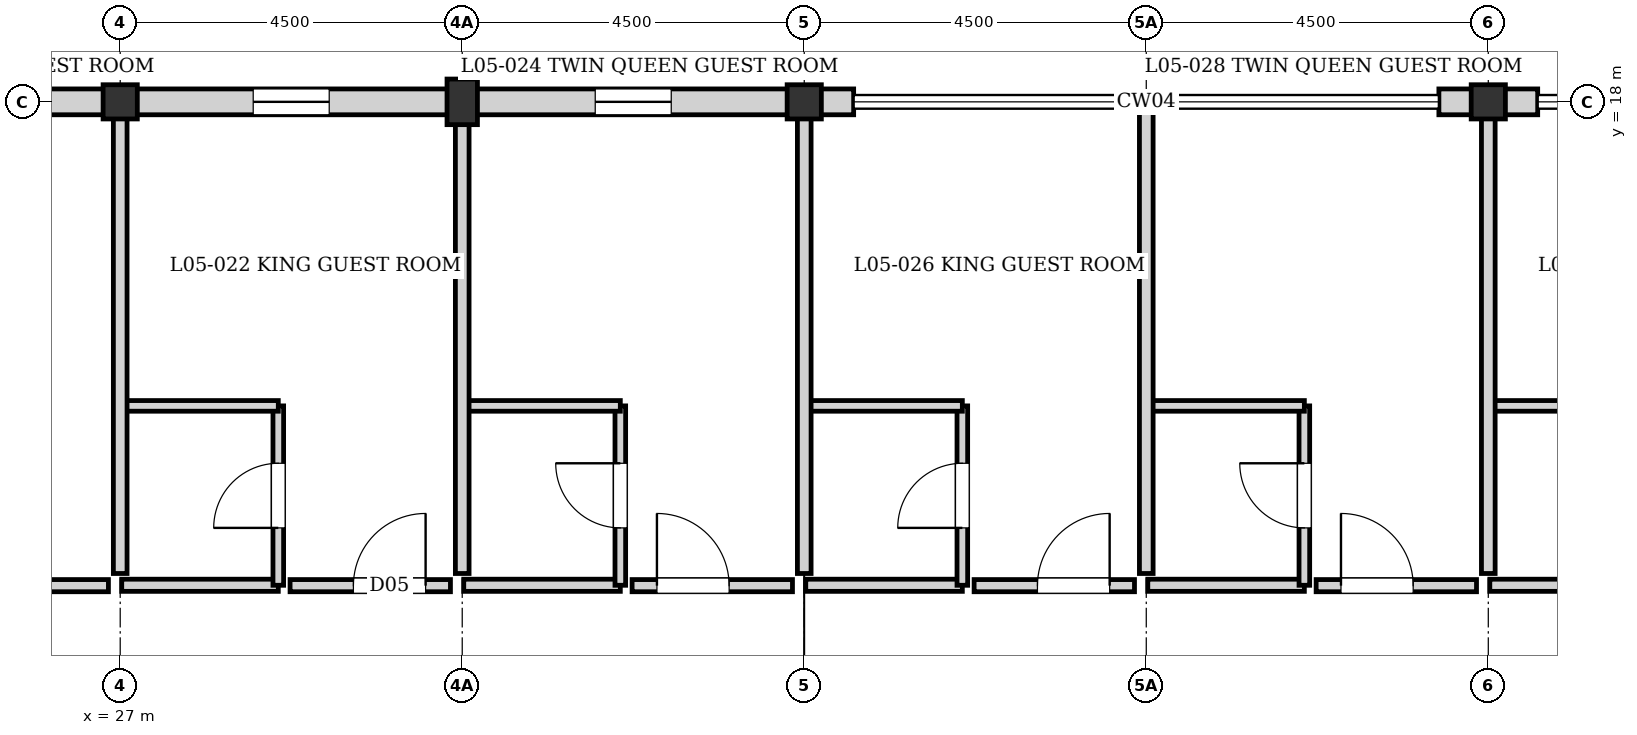
"""IFC4 building model, lengths in metres.
Left out: names, types, materials, properties, quantities, classifications, styles, units other than length and angle.
Written with IfcOpenShell. Run it as: python <this file> out.ifc"""

import sys

from ifc_helpers import new_model, si_unit, direction, frame, frame_2d, origin, origin_2d, place, context, subcontext, project, spatial, rectangle, extrude, element, fill, save


model = new_model("IFC4")
c1 = context("Model", 3, precision=1e-05, world=origin(), true_north=direction((0.0, 1.0)))
c2 = subcontext(c1, "Body", "Model", "MODEL_VIEW")
j1 = project(units=[si_unit("LENGTHUNIT", "METRE"), si_unit("PLANEANGLEUNIT", "RADIAN")], contexts=[c1])
p1 = place(None, origin())
s1 = spatial("IfcSite", under=j1, at=p1, CompositionType="ELEMENT")
p2 = place(p1, origin())
s2 = spatial("IfcBuilding", under=s1, at=p2, CompositionType="ELEMENT")
p3 = place(p2, frame((0.0, 0.0, 17.6)))
s3 = spatial("IfcBuildingStorey", under=s2, at=p3, CompositionType="ELEMENT", Elevation=17.6)
for number, where, z_axis, x_axis in (
    (1, (27.0, 18.0, 0.0), (0.0, 0.0, 1.0), (1.0, 0.0, 0.0)),
    (2, (36.0, 18.0, 0.0), (0.0, 0.0, 1.0), (1.0, 0.0, 0.0)),
    (3, (45.0, 18.0, 0.0), (0.0, 0.0, 1.0), (1.0, 0.0, 0.0)),
):
    element("IfcColumn", number, at=place(p3, frame(where, z_axis=z_axis, x_axis=x_axis)), inside=s3, PredefinedType="COLUMN", context=c2, shape_type="SweptSolid", body=[
        extrude(rectangle(XDim=0.45, YDim=0.45, at=origin_2d()), origin(), (0.0, 0.0, 1.0), 3.04),
    ])
p4 = place(p3, frame((31.5, 18.0, 0.0), z_axis=(0.0, 0.0, 1.0), x_axis=(1.0, 0.0, 0.0)))
e4 = element("IfcColumn", 4, at=p4, inside=s3, PredefinedType="PILASTER", context=c2, shape_type="SweptSolid", body=[
    extrude(rectangle(XDim=0.4, YDim=0.6, at=origin_2d()), origin(), (0.0, 0.0, 1.0), 3.04),
])
p5 = place(p3, frame((18.0, 18.0, 0.0), z_axis=(0.0, 0.0, 1.0), x_axis=(1.0, 0.0, 0.0)))
e5 = element("IfcWall", 5, at=p5, inside=s3, PredefinedType="SOLIDWALL", context=c2, shape_type="SweptSolid", body=[
    extrude(rectangle(XDim=9.0, YDim=0.34, at=frame_2d((4.5, 0.0))), origin(), (0.0, 0.0, 1.0), 2.48),
])
p6 = place(p5, frame((1.75, 0.0, 0.35)))
e6 = element("IfcOpeningElement", 6, at=p6, cuts=e5, PredefinedType="OPENING", context=c2, shape_type="SweptSolid", body=[
    extrude(rectangle(XDim=1.0, YDim=1.6, at=frame_2d((0.5, 0.8))), frame((0.0, 0.18, 0.0), z_axis=(0.0, -1.0, 0.0), x_axis=(1.0, 0.0, 0.0)), (0.0, 0.0, 1.0), 0.36),
])
p7 = place(p5, frame((6.25, 0.0, 0.35)))
e7 = element("IfcOpeningElement", 7, at=p7, cuts=e5, PredefinedType="OPENING", context=c2, shape_type="SweptSolid", body=[
    extrude(rectangle(XDim=1.0, YDim=1.6, at=frame_2d((0.5, 0.8))), frame((0.0, 0.18, 0.0), z_axis=(0.0, -1.0, 0.0), x_axis=(1.0, 0.0, 0.0)), (0.0, 0.0, 1.0), 0.36),
])
p8 = place(p3, frame((27.0, 18.0, 0.0), z_axis=(0.0, 0.0, 1.0), x_axis=(1.0, 0.0, 0.0)))
e8 = element("IfcWall", 8, at=p8, inside=s3, PredefinedType="SOLIDWALL", context=c2, shape_type="SweptSolid", body=[
    extrude(rectangle(XDim=9.0, YDim=0.34, at=frame_2d((4.5, 0.0))), origin(), (0.0, 0.0, 1.0), 2.42),
])
p9 = place(p8, frame((1.75, 0.0, 0.35)))
e9 = element("IfcOpeningElement", 9, at=p9, cuts=e8, PredefinedType="OPENING", context=c2, shape_type="SweptSolid", body=[
    extrude(rectangle(XDim=1.0, YDim=1.6, at=frame_2d((0.5, 0.8))), frame((0.0, 0.18, 0.0), z_axis=(0.0, -1.0, 0.0), x_axis=(1.0, 0.0, 0.0)), (0.0, 0.0, 1.0), 0.36),
])
p10 = place(p8, frame((6.25, 0.0, 0.35)))
e10 = element("IfcOpeningElement", 10, at=p10, cuts=e8, PredefinedType="OPENING", context=c2, shape_type="SweptSolid", body=[
    extrude(rectangle(XDim=1.0, YDim=1.6, at=frame_2d((0.5, 0.8))), frame((0.0, 0.18, 0.0), z_axis=(0.0, -1.0, 0.0), x_axis=(1.0, 0.0, 0.0)), (0.0, 0.0, 1.0), 0.36),
])
for number, where, z_axis, x_axis in (
    (11, (36.0, 18.0, 0.0), (0.0, 0.0, 1.0), (1.0, 0.0, 0.0)),
    (12, (44.35, 18.0, 0.0), (0.0, 0.0, 1.0), (1.0, 0.0, 0.0)),
):
    element("IfcWall", number, at=place(p3, frame(where, z_axis=z_axis, x_axis=x_axis)), inside=s3, PredefinedType="SOLIDWALL", context=c2, shape_type="SweptSolid", body=[
        extrude(rectangle(XDim=0.65, YDim=0.34, at=frame_2d((0.325, 0.0))), origin(), (0.0, 0.0, 1.0), 2.38),
    ])
p11 = place(p3, frame((45.0, 18.0, 0.0), z_axis=(0.0, 0.0, 1.0), x_axis=(1.0, 0.0, 0.0)))
e13 = element("IfcWall", 13, at=p11, inside=s3, PredefinedType="SOLIDWALL", context=c2, shape_type="SweptSolid", body=[
    extrude(rectangle(XDim=0.65, YDim=0.34, at=frame_2d((0.325, 0.0))), origin(), (0.0, 0.0, 1.0), 2.55),
])
p12 = place(p3, frame((27.02, 11.64, 0.0), z_axis=(0.0, 0.0, 1.0), x_axis=(1.0, 0.0, 0.0)))
e14 = element("IfcWall", 14, at=p12, inside=s3, PredefinedType="PARTITIONING", context=c2, shape_type="SweptSolid", body=[
    extrude(rectangle(XDim=2.06, YDim=0.16, at=frame_2d((1.03, 0.0))), origin(), (0.0, 0.0, 1.0), 2.82),
])
p13 = place(p3, frame((29.08, 11.64, 0.0), z_axis=(0.0, 0.0, 1.0), x_axis=(0.0, 1.0, 0.0)))
e15 = element("IfcWall", 15, at=p13, inside=s3, PredefinedType="PLUMBINGWALL", context=c2, shape_type="SweptSolid", body=[
    extrude(rectangle(XDim=2.36, YDim=0.14, at=frame_2d((1.18, 0.0))), origin(), (0.0, 0.0, 1.0), 2.82),
])
p14 = place(p13, frame((0.755, 0.0, 0.0)))
e16 = element("IfcOpeningElement", 16, at=p14, cuts=e15, PredefinedType="OPENING", context=c2, shape_type="SweptSolid", body=[
    extrude(rectangle(XDim=0.85, YDim=2.04, at=frame_2d((0.425, 1.02))), frame((0.0, 0.08, 0.0), z_axis=(0.0, -1.0, 0.0), x_axis=(1.0, 0.0, 0.0)), (0.0, 0.0, 1.0), 0.16),
])
p15 = place(p3, frame((27.02, 14.0, 0.0), z_axis=(0.0, 0.0, 1.0), x_axis=(1.0, 0.0, 0.0)))
e17 = element("IfcWall", 17, at=p15, inside=s3, PredefinedType="PLUMBINGWALL", context=c2, shape_type="SweptSolid", body=[
    extrude(rectangle(XDim=2.06, YDim=0.14, at=frame_2d((1.03, 0.0))), origin(), (0.0, 0.0, 1.0), 2.82),
])
p16 = place(p3, frame((31.52, 11.64, 0.0), z_axis=(0.0, 0.0, 1.0), x_axis=(1.0, 0.0, 0.0)))
e18 = element("IfcWall", 18, at=p16, inside=s3, PredefinedType="PARTITIONING", context=c2, shape_type="SweptSolid", body=[
    extrude(rectangle(XDim=2.06, YDim=0.16, at=frame_2d((1.03, 0.0))), origin(), (0.0, 0.0, 1.0), 2.82),
])
p17 = place(p3, frame((33.58, 11.64, 0.0), z_axis=(0.0, 0.0, 1.0), x_axis=(0.0, 1.0, 0.0)))
e19 = element("IfcWall", 19, at=p17, inside=s3, PredefinedType="PLUMBINGWALL", context=c2, shape_type="SweptSolid", body=[
    extrude(rectangle(XDim=2.36, YDim=0.14, at=frame_2d((1.18, 0.0))), origin(), (0.0, 0.0, 1.0), 2.82),
])
p18 = place(p17, frame((0.755, 0.0, 0.0)))
e20 = element("IfcOpeningElement", 20, at=p18, cuts=e19, PredefinedType="OPENING", context=c2, shape_type="SweptSolid", body=[
    extrude(rectangle(XDim=0.85, YDim=2.04, at=frame_2d((0.425, 1.02))), frame((0.0, 0.08, 0.0), z_axis=(0.0, -1.0, 0.0), x_axis=(1.0, 0.0, 0.0)), (0.0, 0.0, 1.0), 0.16),
])
p19 = place(p3, frame((31.52, 14.0, 0.0), z_axis=(0.0, 0.0, 1.0), x_axis=(1.0, 0.0, 0.0)))
e21 = element("IfcWall", 21, at=p19, inside=s3, PredefinedType="PLUMBINGWALL", context=c2, shape_type="SweptSolid", body=[
    extrude(rectangle(XDim=2.06, YDim=0.14, at=frame_2d((1.03, 0.0))), origin(), (0.0, 0.0, 1.0), 2.82),
])
p20 = place(p3, frame((36.02, 11.64, 0.0), z_axis=(0.0, 0.0, 1.0), x_axis=(1.0, 0.0, 0.0)))
e22 = element("IfcWall", 22, at=p20, inside=s3, PredefinedType="PARTITIONING", context=c2, shape_type="SweptSolid", body=[
    extrude(rectangle(XDim=2.06, YDim=0.16, at=frame_2d((1.03, 0.0))), origin(), (0.0, 0.0, 1.0), 2.82),
])
p21 = place(p3, frame((38.08, 11.64, 0.0), z_axis=(0.0, 0.0, 1.0), x_axis=(0.0, 1.0, 0.0)))
e23 = element("IfcWall", 23, at=p21, inside=s3, PredefinedType="PLUMBINGWALL", context=c2, shape_type="SweptSolid", body=[
    extrude(rectangle(XDim=2.36, YDim=0.14, at=frame_2d((1.18, 0.0))), origin(), (0.0, 0.0, 1.0), 2.82),
])
p22 = place(p21, frame((0.755, 0.0, 0.0)))
e24 = element("IfcOpeningElement", 24, at=p22, cuts=e23, PredefinedType="OPENING", context=c2, shape_type="SweptSolid", body=[
    extrude(rectangle(XDim=0.85, YDim=2.04, at=frame_2d((0.425, 1.02))), frame((0.0, 0.08, 0.0), z_axis=(0.0, -1.0, 0.0), x_axis=(1.0, 0.0, 0.0)), (0.0, 0.0, 1.0), 0.16),
])
p23 = place(p3, frame((36.02, 14.0, 0.0), z_axis=(0.0, 0.0, 1.0), x_axis=(1.0, 0.0, 0.0)))
e25 = element("IfcWall", 25, at=p23, inside=s3, PredefinedType="PLUMBINGWALL", context=c2, shape_type="SweptSolid", body=[
    extrude(rectangle(XDim=2.06, YDim=0.14, at=frame_2d((1.03, 0.0))), origin(), (0.0, 0.0, 1.0), 2.82),
])
p24 = place(p3, frame((40.52, 11.64, 0.0), z_axis=(0.0, 0.0, 1.0), x_axis=(1.0, 0.0, 0.0)))
e26 = element("IfcWall", 26, at=p24, inside=s3, PredefinedType="PARTITIONING", context=c2, shape_type="SweptSolid", body=[
    extrude(rectangle(XDim=2.06, YDim=0.16, at=frame_2d((1.03, 0.0))), origin(), (0.0, 0.0, 1.0), 2.82),
])
p25 = place(p3, frame((42.58, 11.64, 0.0), z_axis=(0.0, 0.0, 1.0), x_axis=(0.0, 1.0, 0.0)))
e27 = element("IfcWall", 27, at=p25, inside=s3, PredefinedType="PLUMBINGWALL", context=c2, shape_type="SweptSolid", body=[
    extrude(rectangle(XDim=2.36, YDim=0.14, at=frame_2d((1.18, 0.0))), origin(), (0.0, 0.0, 1.0), 2.82),
])
p26 = place(p25, frame((0.755, 0.0, 0.0)))
e28 = element("IfcOpeningElement", 28, at=p26, cuts=e27, PredefinedType="OPENING", context=c2, shape_type="SweptSolid", body=[
    extrude(rectangle(XDim=0.85, YDim=2.04, at=frame_2d((0.425, 1.02))), frame((0.0, 0.08, 0.0), z_axis=(0.0, -1.0, 0.0), x_axis=(1.0, 0.0, 0.0)), (0.0, 0.0, 1.0), 0.16),
])
p27 = place(p3, frame((40.52, 14.0, 0.0), z_axis=(0.0, 0.0, 1.0), x_axis=(1.0, 0.0, 0.0)))
e29 = element("IfcWall", 29, at=p27, inside=s3, PredefinedType="PLUMBINGWALL", context=c2, shape_type="SweptSolid", body=[
    extrude(rectangle(XDim=2.06, YDim=0.14, at=frame_2d((1.03, 0.0))), origin(), (0.0, 0.0, 1.0), 2.82),
])
p28 = place(p3, frame((45.02, 11.64, 0.0), z_axis=(0.0, 0.0, 1.0), x_axis=(1.0, 0.0, 0.0)))
e30 = element("IfcWall", 30, at=p28, inside=s3, PredefinedType="PARTITIONING", context=c2, shape_type="SweptSolid", body=[
    extrude(rectangle(XDim=2.06, YDim=0.16, at=frame_2d((1.03, 0.0))), origin(), (0.0, 0.0, 1.0), 2.82),
])
p29 = place(p3, frame((45.02, 14.0, 0.0), z_axis=(0.0, 0.0, 1.0), x_axis=(1.0, 0.0, 0.0)))
e31 = element("IfcWall", 31, at=p29, inside=s3, PredefinedType="PLUMBINGWALL", context=c2, shape_type="SweptSolid", body=[
    extrude(rectangle(XDim=2.06, YDim=0.14, at=frame_2d((1.03, 0.0))), origin(), (0.0, 0.0, 1.0), 2.82),
])
p30 = place(p3, frame((27.0, 11.795, 0.0), z_axis=(0.0, 0.0, 1.0), x_axis=(0.0, 1.0, 0.0)))
e32 = element("IfcWall", 32, at=p30, inside=s3, PredefinedType="PARTITIONING", context=c2, shape_type="SweptSolid", body=[
    extrude(rectangle(XDim=6.03, YDim=0.18, at=frame_2d((3.015, 0.0))), origin(), (0.0, 0.0, 1.0), 2.29),
])
p31 = place(p3, frame((31.5, 11.795, 0.0), z_axis=(0.0, 0.0, 1.0), x_axis=(0.0, 1.0, 0.0)))
e33 = element("IfcWall", 33, at=p31, inside=s3, PredefinedType="PARTITIONING", context=c2, shape_type="SweptSolid", body=[
    extrude(rectangle(XDim=6.03, YDim=0.18, at=frame_2d((3.015, 0.0))), origin(), (0.0, 0.0, 1.0), 2.82),
])
p32 = place(p3, frame((36.0, 11.795, 0.0), z_axis=(0.0, 0.0, 1.0), x_axis=(0.0, 1.0, 0.0)))
e34 = element("IfcWall", 34, at=p32, inside=s3, PredefinedType="PARTITIONING", context=c2, shape_type="SweptSolid", body=[
    extrude(rectangle(XDim=6.03, YDim=0.18, at=frame_2d((3.015, 0.0))), origin(), (0.0, 0.0, 1.0), 2.19),
])
p33 = place(p3, frame((40.5, 11.795, 0.0), z_axis=(0.0, 0.0, 1.0), x_axis=(0.0, 1.0, 0.0)))
e35 = element("IfcWall", 35, at=p33, inside=s3, PredefinedType="PARTITIONING", context=c2, shape_type="SweptSolid", body=[
    extrude(rectangle(XDim=6.11, YDim=0.18, at=frame_2d((3.055, 0.0))), origin(), (0.0, 0.0, 1.0), 2.82),
])
p34 = place(p3, frame((45.0, 11.795, 0.0), z_axis=(0.0, 0.0, 1.0), x_axis=(0.0, 1.0, 0.0)))
e36 = element("IfcWall", 36, at=p34, inside=s3, PredefinedType="PARTITIONING", context=c2, shape_type="SweptSolid", body=[
    extrude(rectangle(XDim=6.03, YDim=0.18, at=frame_2d((3.015, 0.0))), origin(), (0.0, 0.0, 1.0), 2.09),
])
p35 = place(p3, frame((24.735, 11.635, 0.0), z_axis=(0.0, 0.0, 1.0), x_axis=(1.0, 0.0, 0.0)))
e37 = element("IfcWall", 37, at=p35, inside=s3, PredefinedType="PARTITIONING", context=c2, shape_type="SweptSolid", body=[
    extrude(rectangle(XDim=2.11, YDim=0.16, at=frame_2d((1.055, 0.0))), origin(), (0.0, 0.0, 1.0), 2.82),
])
p36 = place(p35, frame((0.327, 0.0, 0.0)))
e38 = element("IfcOpeningElement", 38, at=p36, cuts=e37, PredefinedType="OPENING", context=c2, shape_type="SweptSolid", body=[
    extrude(rectangle(XDim=0.95, YDim=2.15, at=frame_2d((0.475, 1.075))), frame((0.0, 0.09, 0.0), z_axis=(0.0, -1.0, 0.0), x_axis=(1.0, 0.0, 0.0)), (0.0, 0.0, 1.0), 0.18),
])
p37 = place(p3, frame((29.235, 11.635, 0.0), z_axis=(0.0, 0.0, 1.0), x_axis=(1.0, 0.0, 0.0)))
e39 = element("IfcWall", 39, at=p37, inside=s3, PredefinedType="PARTITIONING", context=c2, shape_type="SweptSolid", body=[
    extrude(rectangle(XDim=2.11, YDim=0.16, at=frame_2d((1.055, 0.0))), origin(), (0.0, 0.0, 1.0), 2.82),
])
p38 = place(p37, frame((0.833, 0.0, 0.0)))
e40 = element("IfcOpeningElement", 40, at=p38, cuts=e39, PredefinedType="OPENING", context=c2, shape_type="SweptSolid", body=[
    extrude(rectangle(XDim=0.95, YDim=2.15, at=frame_2d((0.475, 1.075))), frame((0.0, 0.09, 0.0), z_axis=(0.0, -1.0, 0.0), x_axis=(1.0, 0.0, 0.0)), (0.0, 0.0, 1.0), 0.18),
])
p39 = place(p3, frame((33.735, 11.635, 0.0), z_axis=(0.0, 0.0, 1.0), x_axis=(1.0, 0.0, 0.0)))
e41 = element("IfcWall", 41, at=p39, inside=s3, PredefinedType="PARTITIONING", context=c2, shape_type="SweptSolid", body=[
    extrude(rectangle(XDim=2.11, YDim=0.16, at=frame_2d((1.055, 0.0))), origin(), (0.0, 0.0, 1.0), 2.82),
])
p40 = place(p39, frame((0.327, 0.0, 0.0)))
e42 = element("IfcOpeningElement", 42, at=p40, cuts=e41, PredefinedType="OPENING", context=c2, shape_type="SweptSolid", body=[
    extrude(rectangle(XDim=0.95, YDim=2.15, at=frame_2d((0.475, 1.075))), frame((0.0, 0.09, 0.0), z_axis=(0.0, -1.0, 0.0), x_axis=(1.0, 0.0, 0.0)), (0.0, 0.0, 1.0), 0.18),
])
p41 = place(p3, frame((38.235, 11.635, 0.0), z_axis=(0.0, 0.0, 1.0), x_axis=(1.0, 0.0, 0.0)))
e43 = element("IfcWall", 43, at=p41, inside=s3, PredefinedType="PARTITIONING", context=c2, shape_type="SweptSolid", body=[
    extrude(rectangle(XDim=2.11, YDim=0.16, at=frame_2d((1.055, 0.0))), origin(), (0.0, 0.0, 1.0), 2.82),
])
p42 = place(p41, frame((0.833, 0.0, 0.0)))
e44 = element("IfcOpeningElement", 44, at=p42, cuts=e43, PredefinedType="OPENING", context=c2, shape_type="SweptSolid", body=[
    extrude(rectangle(XDim=0.95, YDim=2.15, at=frame_2d((0.475, 1.075))), frame((0.0, 0.09, 0.0), z_axis=(0.0, -1.0, 0.0), x_axis=(1.0, 0.0, 0.0)), (0.0, 0.0, 1.0), 0.18),
])
p43 = place(p3, frame((42.735, 11.635, 0.0), z_axis=(0.0, 0.0, 1.0), x_axis=(1.0, 0.0, 0.0)))
e45 = element("IfcWall", 45, at=p43, inside=s3, PredefinedType="PARTITIONING", context=c2, shape_type="SweptSolid", body=[
    extrude(rectangle(XDim=2.11, YDim=0.16, at=frame_2d((1.055, 0.0))), origin(), (0.0, 0.0, 1.0), 2.82),
])
p44 = place(p43, frame((0.327, 0.0, 0.0)))
e46 = element("IfcOpeningElement", 46, at=p44, cuts=e45, PredefinedType="OPENING", context=c2, shape_type="SweptSolid", body=[
    extrude(rectangle(XDim=0.95, YDim=2.15, at=frame_2d((0.475, 1.075))), frame((0.0, 0.09, 0.0), z_axis=(0.0, -1.0, 0.0), x_axis=(1.0, 0.0, 0.0)), (0.0, 0.0, 1.0), 0.18),
])
p45 = place(p9, origin())
e47 = element("IfcWindow", 47, at=p45, inside=s3, PartitioningType="SINGLE_PANEL", PredefinedType="WINDOW", context=c2, shape_type="SweptSolid", body=[
    extrude(rectangle(XDim=1.0, YDim=1.6, at=frame_2d((0.5, 0.8))), frame((0.0, 0.03, 0.0), z_axis=(0.0, -1.0, 0.0), x_axis=(1.0, 0.0, 0.0)), (0.0, 0.0, 1.0), 0.06),
])
fill(e9, e47)
p46 = place(p10, origin())
e48 = element("IfcWindow", 48, at=p46, inside=s3, PartitioningType="SINGLE_PANEL", PredefinedType="WINDOW", context=c2, shape_type="SweptSolid", body=[
    extrude(rectangle(XDim=1.0, YDim=1.6, at=frame_2d((0.5, 0.8))), frame((0.0, 0.03, 0.0), z_axis=(0.0, -1.0, 0.0), x_axis=(1.0, 0.0, 0.0)), (0.0, 0.0, 1.0), 0.06),
])
fill(e10, e48)
p47 = place(p14, origin())
e49 = element("IfcDoor", 49, at=p47, inside=s3, OperationType="SINGLE_SWING_LEFT", PredefinedType="DOOR", context=c2, shape_type="SweptSolid", body=[
    extrude(rectangle(XDim=0.85, YDim=2.04, at=frame_2d((0.425, 1.02))), frame((0.0, 0.025, 0.0), z_axis=(0.0, -1.0, 0.0), x_axis=(1.0, 0.0, 0.0)), (0.0, 0.0, 1.0), 0.05),
])
fill(e16, e49)
p48 = place(p18, origin())
e50 = element("IfcDoor", 50, at=p48, inside=s3, OperationType="SINGLE_SWING_RIGHT", PredefinedType="DOOR", context=c2, shape_type="SweptSolid", body=[
    extrude(rectangle(XDim=0.85, YDim=2.04, at=frame_2d((0.425, 1.02))), frame((0.0, 0.025, 0.0), z_axis=(0.0, -1.0, 0.0), x_axis=(1.0, 0.0, 0.0)), (0.0, 0.0, 1.0), 0.05),
])
fill(e20, e50)
p49 = place(p22, origin())
e51 = element("IfcDoor", 51, at=p49, inside=s3, OperationType="SINGLE_SWING_LEFT", PredefinedType="DOOR", context=c2, shape_type="SweptSolid", body=[
    extrude(rectangle(XDim=0.85, YDim=2.04, at=frame_2d((0.425, 1.02))), frame((0.0, 0.025, 0.0), z_axis=(0.0, -1.0, 0.0), x_axis=(1.0, 0.0, 0.0)), (0.0, 0.0, 1.0), 0.05),
])
fill(e24, e51)
p50 = place(p26, origin())
e52 = element("IfcDoor", 52, at=p50, inside=s3, OperationType="SINGLE_SWING_RIGHT", PredefinedType="DOOR", context=c2, shape_type="SweptSolid", body=[
    extrude(rectangle(XDim=0.85, YDim=2.04, at=frame_2d((0.425, 1.02))), frame((0.0, 0.025, 0.0), z_axis=(0.0, -1.0, 0.0), x_axis=(1.0, 0.0, 0.0)), (0.0, 0.0, 1.0), 0.05),
])
fill(e28, e52)
p51 = place(p38, origin())
e53 = element("IfcDoor", 53, at=p51, inside=s3, OperationType="SINGLE_SWING_RIGHT", PredefinedType="DOOR", context=c2, shape_type="SweptSolid", body=[
    extrude(rectangle(XDim=0.95, YDim=2.15, at=frame_2d((0.475, 1.075))), frame((0.0, 0.025, 0.0), z_axis=(0.0, -1.0, 0.0), x_axis=(1.0, 0.0, 0.0)), (0.0, 0.0, 1.0), 0.05),
])
fill(e40, e53)
p52 = place(p40, origin())
e54 = element("IfcDoor", 54, at=p52, inside=s3, OperationType="SINGLE_SWING_LEFT", PredefinedType="DOOR", context=c2, shape_type="SweptSolid", body=[
    extrude(rectangle(XDim=0.95, YDim=2.15, at=frame_2d((0.475, 1.075))), frame((0.0, 0.025, 0.0), z_axis=(0.0, -1.0, 0.0), x_axis=(1.0, 0.0, 0.0)), (0.0, 0.0, 1.0), 0.05),
])
fill(e42, e54)
p53 = place(p42, origin())
e55 = element("IfcDoor", 55, at=p53, inside=s3, OperationType="SINGLE_SWING_RIGHT", PredefinedType="DOOR", context=c2, shape_type="SweptSolid", body=[
    extrude(rectangle(XDim=0.95, YDim=2.15, at=frame_2d((0.475, 1.075))), frame((0.0, 0.025, 0.0), z_axis=(0.0, -1.0, 0.0), x_axis=(1.0, 0.0, 0.0)), (0.0, 0.0, 1.0), 0.05),
])
fill(e44, e55)
p54 = place(p44, origin())
e56 = element("IfcDoor", 56, at=p54, inside=s3, OperationType="SINGLE_SWING_LEFT", PredefinedType="DOOR", context=c2, shape_type="SweptSolid", body=[
    extrude(rectangle(XDim=0.95, YDim=2.15, at=frame_2d((0.475, 1.075))), frame((0.0, 0.025, 0.0), z_axis=(0.0, -1.0, 0.0), x_axis=(1.0, 0.0, 0.0)), (0.0, 0.0, 1.0), 0.05),
])
fill(e46, e56)
save(model, sys.argv[1])
